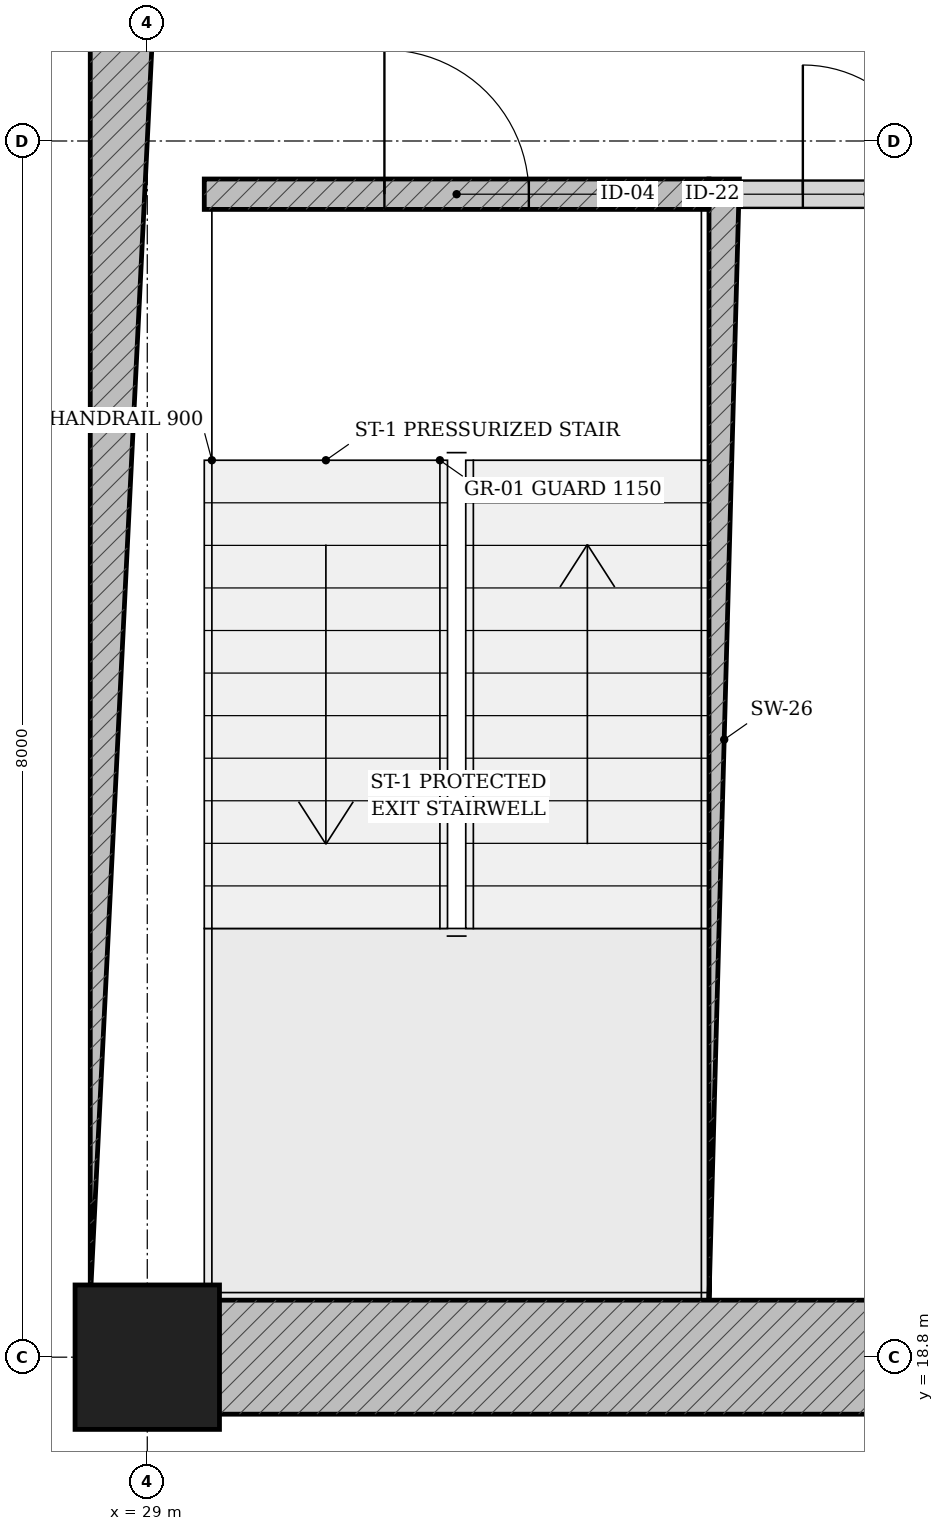
"""IFC4 building model, lengths in metres.
Left out: names, types, materials, properties, quantities, classifications, styles, units other than length and angle.
Written with IfcOpenShell. Run it as: python <this file> out.ifc"""

import sys

from ifc_helpers import new_model, si_unit, direction, frame, frame_2d, origin, origin_2d, place, context, subcontext, project, spatial, rectangle, extrude, source, transform, mapped, element, fill, save


model = new_model("IFC4")
c1 = context("Model", 3, precision=1e-05, world=origin(), true_north=direction((-0.2419218956, 0.970295726276)))
c2 = subcontext(c1, "Body", "Model", "MODEL_VIEW")
j1 = project(units=[si_unit("LENGTHUNIT", "METRE"), si_unit("PLANEANGLEUNIT", "RADIAN")], contexts=[c1])
p1 = place(None, origin())
s1 = spatial("IfcSite", under=j1, at=p1, CompositionType="ELEMENT")
p2 = place(p1, origin())
s2 = spatial("IfcBuilding", under=s1, at=p2, CompositionType="ELEMENT")
p3 = place(p2, frame((0.0, 0.0, -8.4)))
s3 = spatial("IfcBuildingStorey", under=s2, at=p3, CompositionType="ELEMENT", Elevation=-8.4)
p4 = place(p3, frame((29.0, 18.8, 0.0), z_axis=(0.0, 0.0, 1.0), x_axis=(1.0, 0.0, 0.0)))
e1 = element("IfcColumn", 1, at=p4, inside=s3, PredefinedType="COLUMN", context=c2, shape_type="SweptSolid", body=[
    extrude(rectangle(XDim=1.1, YDim=1.1, at=origin_2d()), origin(), (0.0, 0.0, 1.0), 4.2),
])
p5 = place(p3, frame((28.625, 18.8, 0.0), z_axis=(0.0, 0.0, 1.0), x_axis=(1.0, 0.0, 0.0)))
e2 = element("IfcWall", 2, at=p5, inside=s3, PredefinedType="SHEAR", context=c2, shape_type="SweptSolid", body=[
    extrude(rectangle(XDim=18.75, YDim=0.75, at=frame_2d((9.375, 0.0))), origin(), (0.0, 0.0, 1.0), 3.88),
])
p6 = place(p5, frame((8.95, 0.0, 0.0)))
e3 = element("IfcOpeningElement", 3, at=p6, cuts=e2, PredefinedType="OPENING", context=c2, shape_type="SweptSolid", body=[
    extrude(rectangle(XDim=0.85, YDim=2.1, at=frame_2d((0.425, 1.05))), frame((0.0, 0.385, 0.0), z_axis=(0.0, -1.0, 0.0), x_axis=(1.0, 0.0, 0.0)), (0.0, 0.0, 1.0), 0.77),
])
p7 = place(p3, frame((29.0, 19.175, 0.0), z_axis=(0.0, 0.0, 1.0), x_axis=(0.0, 1.0, 0.0)))
e4 = element("IfcWall", 4, at=p7, inside=s3, PredefinedType="SHEAR", context=c2, shape_type="SweptSolid", body=[
    extrude(rectangle(XDim=15.25, YDim=0.75, at=frame_2d((7.625, 0.0))), origin(), (0.0, 0.0, 1.0), 3.88),
])
p8 = place(p7, frame((9.875, 0.0, 0.0)))
e5 = element("IfcOpeningElement", 5, at=p8, cuts=e4, PredefinedType="OPENING", context=c2, shape_type="SweptSolid", body=[
    extrude(rectangle(XDim=1.5, YDim=2.2, at=frame_2d((0.75, 1.1))), frame((0.0, 0.385, 0.0), z_axis=(0.0, -1.0, 0.0), x_axis=(1.0, 0.0, 0.0)), (0.0, 0.0, 1.0), 0.77),
])
p9 = place(p3, frame((32.795, 19.175, 0.0), z_axis=(0.0, 0.0, 1.0), x_axis=(0.0, 1.0, 0.0)))
e6 = element("IfcWall", 6, at=p9, inside=s3, PredefinedType="SOLIDWALL", context=c2, shape_type="SweptSolid", body=[
    extrude(rectangle(XDim=7.375, YDim=0.2, at=frame_2d((3.688, 0.0))), origin(), (0.0, 0.0, 1.0), 3.88),
])
p10 = place(p3, frame((29.375, 26.45, 0.0), z_axis=(0.0, 0.0, 1.0), x_axis=(1.0, 0.0, 0.0)))
e7 = element("IfcWall", 7, at=p10, inside=s3, PredefinedType="SOLIDWALL", context=c2, shape_type="SweptSolid", body=[
    extrude(rectangle(XDim=3.32, YDim=0.2, at=frame_2d((1.66, 0.0))), origin(), (0.0, 0.0, 1.0), 3.88),
])
p11 = place(p10, frame((1.185, 0.0, 0.0)))
e8 = element("IfcOpeningElement", 8, at=p11, cuts=e7, PredefinedType="OPENING", context=c2, shape_type="SweptSolid", body=[
    extrude(rectangle(XDim=0.95, YDim=2.15, at=frame_2d((0.475, 1.075))), frame((0.0, 0.11, 0.0), z_axis=(0.0, -1.0, 0.0), x_axis=(1.0, 0.0, 0.0)), (0.0, 0.0, 1.0), 0.22),
])
p12 = place(p3, frame((32.9, 26.45, 0.0), z_axis=(0.0, 0.0, 1.0), x_axis=(1.0, 0.0, 0.0)))
e9 = element("IfcWall", 9, at=p12, inside=s3, PredefinedType="PARTITIONING", context=c2, shape_type="SweptSolid", body=[
    extrude(rectangle(XDim=1.675, YDim=0.18, at=frame_2d((0.837, 0.0))), origin(), (0.0, 0.0, 1.0), 3.88),
])
p13 = place(p12, frame((0.413, 0.0, 0.0)))
e10 = element("IfcOpeningElement", 10, at=p13, cuts=e9, PredefinedType="OPENING", context=c2, shape_type="SweptSolid", body=[
    extrude(rectangle(XDim=0.85, YDim=2.1, at=frame_2d((0.425, 1.05))), frame((0.0, 0.1, 0.0), z_axis=(0.0, -1.0, 0.0), x_axis=(1.0, 0.0, 0.0)), (0.0, 0.0, 1.0), 0.2),
])
m1 = source(origin(), c2, "Body", "SweptSolid", [
    extrude(rectangle(XDim=0.95, YDim=2.15, at=frame_2d((0.475, 1.075))), frame((0.0, 0.025, 0.0), z_axis=(0.0, -1.0, 0.0), x_axis=(1.0, 0.0, 0.0)), (0.0, 0.0, 1.0), 0.05),
])
p14 = place(p11, origin())
e11 = element("IfcDoor", 11, at=p14, inside=s3, OperationType="SINGLE_SWING_LEFT", PredefinedType="DOOR", context=c2, shape_type="MappedRepresentation", body=[
    mapped(m1, transform((0.0, 0.0, 0.0), scale=1.0)),
])
fill(e8, e11)
m2 = source(origin(), c2, "Body", "SweptSolid", [
    extrude(rectangle(XDim=0.85, YDim=2.1, at=frame_2d((0.425, 1.05))), frame((0.0, 0.025, 0.0), z_axis=(0.0, -1.0, 0.0), x_axis=(1.0, 0.0, 0.0)), (0.0, 0.0, 1.0), 0.05),
])
p15 = place(p13, origin())
e12 = element("IfcDoor", 12, at=p15, inside=s3, OperationType="SINGLE_SWING_LEFT", PredefinedType="DOOR", context=c2, shape_type="MappedRepresentation", body=[
    mapped(m2, transform((0.0, 0.0, 0.0), scale=1.0)),
])
fill(e10, e12)
save(model, sys.argv[1])
